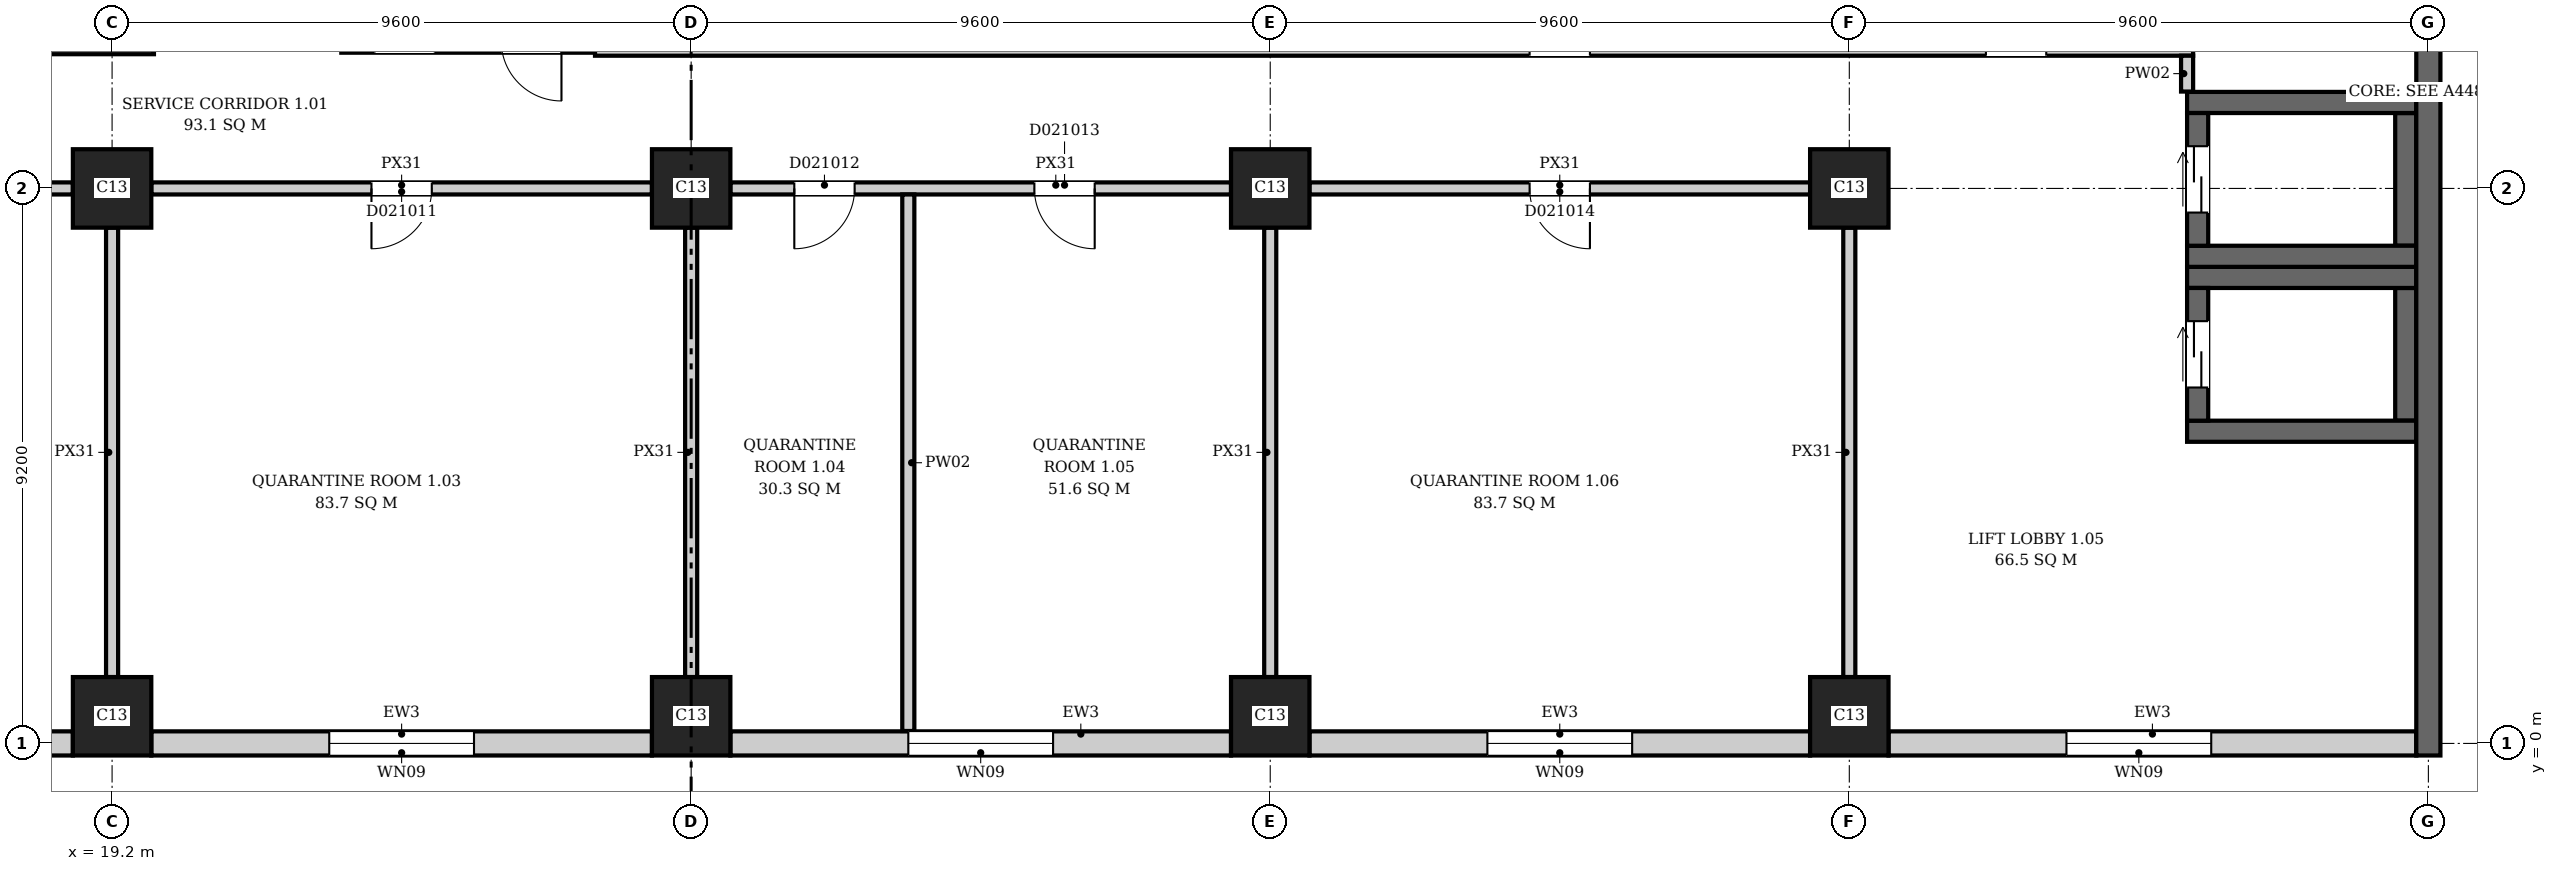
"""IFC4 building model, lengths in metres.
Left out: names, types, materials, properties, quantities, classifications, styles, units other than length and angle.
Written with IfcOpenShell. Run it as: python <this file> out.ifc"""

import sys

from ifc_helpers import new_model, si_unit, direction, frame, frame_2d, origin, origin_2d, place, context, subcontext, project, spatial, rectangle, extrude, element, fill, save


model = new_model("IFC4")
c1 = context("Model", 3, precision=1e-05, world=origin(), true_north=direction((0.0, 1.0)))
c2 = subcontext(c1, "Body", "Model", "MODEL_VIEW")
j1 = project(units=[si_unit("LENGTHUNIT", "METRE"), si_unit("PLANEANGLEUNIT", "RADIAN")], contexts=[c1])
p1 = place(None, origin())
s1 = spatial("IfcSite", under=j1, at=p1, CompositionType="ELEMENT")
p2 = place(p1, origin())
s2 = spatial("IfcBuilding", under=s1, at=p2, CompositionType="ELEMENT")
p3 = place(p2, frame((0.0, 0.0, 6.5)))
s3 = spatial("IfcBuildingStorey", under=s2, at=p3, CompositionType="ELEMENT", Elevation=6.5)
p4 = place(p3, frame((57.6, -0.2, 0.0), z_axis=(0.0, 0.0, 1.0), x_axis=(0.0, 1.0, 0.0)))
e1 = element("IfcWall", 1, at=p4, inside=s3, PredefinedType="SHEAR", context=c2, shape_type="SweptSolid", body=[
    extrude(rectangle(XDim=46.88, YDim=0.4, at=frame_2d((23.44, 0.0))), origin(), (0.0, 0.0, 1.0), 7.7),
])
for number, where, z_axis, x_axis in (
    (2, (53.6, 5.175, 0.0), (0.0, 0.0, 1.0), (1.0, 0.0, 0.0)),
    (3, (53.6, 7.725, 0.0), (0.0, 0.0, 1.0), (1.0, 0.0, 0.0)),
):
    element("IfcWall", number, at=place(p3, frame(where, z_axis=z_axis, x_axis=x_axis)), inside=s3, PredefinedType="SHEAR", context=c2, shape_type="SweptSolid", body=[
        extrude(rectangle(XDim=3.8, YDim=0.35, at=frame_2d((1.9, 0.0))), origin(), (0.0, 0.0, 1.0), 7.7),
    ])
p5 = place(p3, frame((53.775, 5.35, 0.0), z_axis=(0.0, 0.0, 1.0), x_axis=(0.0, 1.0, 0.0)))
e4 = element("IfcWall", 4, at=p5, inside=s3, PredefinedType="SHEAR", context=c2, shape_type="SweptSolid", body=[
    extrude(rectangle(XDim=2.2, YDim=0.35, at=frame_2d((1.1, 0.0))), origin(), (0.0, 0.0, 1.0), 7.7),
])
p6 = place(p5, frame((0.55, 0.0, 0.0)))
e5 = element("IfcOpeningElement", 5, at=p6, cuts=e4, PredefinedType="OPENING", context=c2, shape_type="SweptSolid", body=[
    extrude(rectangle(XDim=1.1, YDim=2.1, at=frame_2d((0.55, 1.05))), frame((0.0, 0.185, 0.0), z_axis=(0.0, -1.0, 0.0), x_axis=(1.0, 0.0, 0.0)), (0.0, 0.0, 1.0), 0.37),
])
p7 = place(p3, frame((57.225, 5.35, 0.0), z_axis=(0.0, 0.0, 1.0), x_axis=(0.0, 1.0, 0.0)))
e6 = element("IfcWall", 6, at=p7, inside=s3, PredefinedType="SHEAR", context=c2, shape_type="SweptSolid", body=[
    extrude(rectangle(XDim=2.2, YDim=0.35, at=frame_2d((1.1, 0.0))), origin(), (0.0, 0.0, 1.0), 7.7),
])
for number, where, z_axis, x_axis in (
    (7, (53.6, 8.075, 0.0), (0.0, 0.0, 1.0), (1.0, 0.0, 0.0)),
    (8, (53.6, 10.625, 0.0), (0.0, 0.0, 1.0), (1.0, 0.0, 0.0)),
):
    element("IfcWall", number, at=place(p3, frame(where, z_axis=z_axis, x_axis=x_axis)), inside=s3, PredefinedType="SHEAR", context=c2, shape_type="SweptSolid", body=[
        extrude(rectangle(XDim=3.8, YDim=0.35, at=frame_2d((1.9, 0.0))), origin(), (0.0, 0.0, 1.0), 7.7),
    ])
p8 = place(p3, frame((53.775, 8.25, 0.0), z_axis=(0.0, 0.0, 1.0), x_axis=(0.0, 1.0, 0.0)))
e9 = element("IfcWall", 9, at=p8, inside=s3, PredefinedType="SHEAR", context=c2, shape_type="SweptSolid", body=[
    extrude(rectangle(XDim=2.2, YDim=0.35, at=frame_2d((1.1, 0.0))), origin(), (0.0, 0.0, 1.0), 7.7),
])
p9 = place(p8, frame((0.55, 0.0, 0.0)))
e10 = element("IfcOpeningElement", 10, at=p9, cuts=e9, PredefinedType="OPENING", context=c2, shape_type="SweptSolid", body=[
    extrude(rectangle(XDim=1.1, YDim=2.1, at=frame_2d((0.55, 1.05))), frame((0.0, 0.185, 0.0), z_axis=(0.0, -1.0, 0.0), x_axis=(1.0, 0.0, 0.0)), (0.0, 0.0, 1.0), 0.37),
])
p10 = place(p3, frame((57.225, 8.25, 0.0), z_axis=(0.0, 0.0, 1.0), x_axis=(0.0, 1.0, 0.0)))
e11 = element("IfcWall", 11, at=p10, inside=s3, PredefinedType="SHEAR", context=c2, shape_type="SweptSolid", body=[
    extrude(rectangle(XDim=2.2, YDim=0.35, at=frame_2d((1.1, 0.0))), origin(), (0.0, 0.0, 1.0), 7.7),
])
for number, where, z_axis, x_axis in (
    (12, (19.2, 0.45, 0.0), (0.0, 0.0, 1.0), (1.0, 0.0, 0.0)),
    (13, (28.8, 0.45, 0.0), (0.0, 0.0, 1.0), (1.0, 0.0, 0.0)),
    (14, (38.4, 0.45, 0.0), (0.0, 0.0, 1.0), (1.0, 0.0, 0.0)),
    (15, (48.0, 0.45, 0.0), (0.0, 0.0, 1.0), (1.0, 0.0, 0.0)),
    (16, (19.2, 9.2, 0.0), (0.0, 0.0, 1.0), (1.0, 0.0, 0.0)),
    (17, (28.8, 9.2, 0.0), (0.0, 0.0, 1.0), (1.0, 0.0, 0.0)),
    (18, (38.4, 9.2, 0.0), (0.0, 0.0, 1.0), (1.0, 0.0, 0.0)),
    (19, (48.0, 9.2, 0.0), (0.0, 0.0, 1.0), (1.0, 0.0, 0.0)),
):
    element("IfcColumn", number, at=place(p3, frame(where, z_axis=z_axis, x_axis=x_axis)), inside=s3, PredefinedType="COLUMN", context=c2, shape_type="SweptSolid", body=[
        extrude(rectangle(XDim=1.3, YDim=1.3, at=origin_2d()), origin(), (0.0, 0.0, 1.0), 7.7),
    ])
p11 = place(p3, frame((10.25, 0.0, 0.0), z_axis=(0.0, 0.0, 1.0), x_axis=(1.0, 0.0, 0.0)))
e20 = element("IfcWall", 20, at=p11, inside=s3, PredefinedType="ELEMENTEDWALL", context=c2, shape_type="SweptSolid", body=[
    extrude(rectangle(XDim=8.3, YDim=0.4, at=frame_2d((4.15, 0.0))), origin(), (0.0, 0.0, 1.0), 7.35),
])
p12 = place(p11, frame((2.95, 0.0, 1.0)))
e21 = element("IfcOpeningElement", 21, at=p12, cuts=e20, PredefinedType="OPENING", context=c2, shape_type="SweptSolid", body=[
    extrude(rectangle(XDim=2.4, YDim=2.2, at=frame_2d((1.2, 1.1))), frame((0.0, 0.21, 0.0), z_axis=(0.0, -1.0, 0.0), x_axis=(1.0, 0.0, 0.0)), (0.0, 0.0, 1.0), 0.42),
])
p13 = place(p3, frame((19.85, 0.0, 0.0), z_axis=(0.0, 0.0, 1.0), x_axis=(1.0, 0.0, 0.0)))
e22 = element("IfcWall", 22, at=p13, inside=s3, PredefinedType="ELEMENTEDWALL", context=c2, shape_type="SweptSolid", body=[
    extrude(rectangle(XDim=8.3, YDim=0.4, at=frame_2d((4.15, 0.0))), origin(), (0.0, 0.0, 1.0), 7.35),
])
p14 = place(p13, frame((2.95, 0.0, 1.0)))
e23 = element("IfcOpeningElement", 23, at=p14, cuts=e22, PredefinedType="OPENING", context=c2, shape_type="SweptSolid", body=[
    extrude(rectangle(XDim=2.4, YDim=2.2, at=frame_2d((1.2, 1.1))), frame((0.0, 0.21, 0.0), z_axis=(0.0, -1.0, 0.0), x_axis=(1.0, 0.0, 0.0)), (0.0, 0.0, 1.0), 0.42),
])
p15 = place(p3, frame((29.45, 0.0, 0.0), z_axis=(0.0, 0.0, 1.0), x_axis=(1.0, 0.0, 0.0)))
e24 = element("IfcWall", 24, at=p15, inside=s3, PredefinedType="ELEMENTEDWALL", context=c2, shape_type="SweptSolid", body=[
    extrude(rectangle(XDim=8.3, YDim=0.4, at=frame_2d((4.15, 0.0))), origin(), (0.0, 0.0, 1.0), 7.35),
])
p16 = place(p15, frame((2.95, 0.0, 1.0)))
e25 = element("IfcOpeningElement", 25, at=p16, cuts=e24, PredefinedType="OPENING", context=c2, shape_type="SweptSolid", body=[
    extrude(rectangle(XDim=2.4, YDim=2.2, at=frame_2d((1.2, 1.1))), frame((0.0, 0.21, 0.0), z_axis=(0.0, -1.0, 0.0), x_axis=(1.0, 0.0, 0.0)), (0.0, 0.0, 1.0), 0.42),
])
p17 = place(p3, frame((39.05, 0.0, 0.0), z_axis=(0.0, 0.0, 1.0), x_axis=(1.0, 0.0, 0.0)))
e26 = element("IfcWall", 26, at=p17, inside=s3, PredefinedType="ELEMENTEDWALL", context=c2, shape_type="SweptSolid", body=[
    extrude(rectangle(XDim=8.3, YDim=0.4, at=frame_2d((4.15, 0.0))), origin(), (0.0, 0.0, 1.0), 7.35),
])
p18 = place(p17, frame((2.95, 0.0, 1.0)))
e27 = element("IfcOpeningElement", 27, at=p18, cuts=e26, PredefinedType="OPENING", context=c2, shape_type="SweptSolid", body=[
    extrude(rectangle(XDim=2.4, YDim=2.2, at=frame_2d((1.2, 1.1))), frame((0.0, 0.21, 0.0), z_axis=(0.0, -1.0, 0.0), x_axis=(1.0, 0.0, 0.0)), (0.0, 0.0, 1.0), 0.42),
])
p19 = place(p3, frame((48.65, 0.0, 0.0), z_axis=(0.0, 0.0, 1.0), x_axis=(1.0, 0.0, 0.0)))
e28 = element("IfcWall", 28, at=p19, inside=s3, PredefinedType="ELEMENTEDWALL", context=c2, shape_type="SweptSolid", body=[
    extrude(rectangle(XDim=8.75, YDim=0.4, at=frame_2d((4.375, 0.0))), origin(), (0.0, 0.0, 1.0), 7.35),
])
p20 = place(p19, frame((2.95, 0.0, 1.0)))
e29 = element("IfcOpeningElement", 29, at=p20, cuts=e28, PredefinedType="OPENING", context=c2, shape_type="SweptSolid", body=[
    extrude(rectangle(XDim=2.4, YDim=2.2, at=frame_2d((1.2, 1.1))), frame((0.0, 0.21, 0.0), z_axis=(0.0, -1.0, 0.0), x_axis=(1.0, 0.0, 0.0)), (0.0, 0.0, 1.0), 0.42),
])
p21 = place(p3, frame((10.25, 9.2, 0.0), z_axis=(0.0, 0.0, 1.0), x_axis=(1.0, 0.0, 0.0)))
e30 = element("IfcWall", 30, at=p21, inside=s3, PredefinedType="PARTITIONING", context=c2, shape_type="SweptSolid", body=[
    extrude(rectangle(XDim=8.3, YDim=0.2, at=frame_2d((4.15, 0.0))), origin(), (0.0, 0.0, 1.0), 6.95),
])
p22 = place(p21, frame((1.06, 0.0, 0.0)))
e31 = element("IfcOpeningElement", 31, at=p22, cuts=e30, PredefinedType="OPENING", context=c2, shape_type="SweptSolid", body=[
    extrude(rectangle(XDim=1.0, YDim=2.1, at=frame_2d((0.5, 1.05))), frame((0.0, 0.11, 0.0), z_axis=(0.0, -1.0, 0.0), x_axis=(1.0, 0.0, 0.0)), (0.0, 0.0, 1.0), 0.22),
])
p23 = place(p21, frame((5.04, 0.0, 0.0)))
e32 = element("IfcOpeningElement", 32, at=p23, cuts=e30, PredefinedType="OPENING", context=c2, shape_type="SweptSolid", body=[
    extrude(rectangle(XDim=1.0, YDim=2.1, at=frame_2d((0.5, 1.05))), frame((0.0, 0.11, 0.0), z_axis=(0.0, -1.0, 0.0), x_axis=(1.0, 0.0, 0.0)), (0.0, 0.0, 1.0), 0.22),
])
p24 = place(p3, frame((10.325, 11.5, 0.0), z_axis=(0.0, 0.0, 1.0), x_axis=(1.0, 0.0, 0.0)))
e33 = element("IfcWall", 33, at=p24, inside=s3, PredefinedType="PARTITIONING", context=c2, shape_type="SweptSolid", body=[
    extrude(rectangle(XDim=9.569, YDim=0.15, at=frame_2d((4.785, 0.0))), origin(), (0.0, 0.0, 1.0), 7.35),
])
p25 = place(p3, frame((19.2, 1.1, 0.0), z_axis=(0.0, 0.0, 1.0), x_axis=(0.0, 1.0, 0.0)))
e34 = element("IfcWall", 34, at=p25, inside=s3, PredefinedType="PARTITIONING", context=c2, shape_type="SweptSolid", body=[
    extrude(rectangle(XDim=7.45, YDim=0.2, at=frame_2d((3.725, 0.0))), origin(), (0.0, 0.0, 1.0), 6.95),
])
p26 = place(p3, frame((19.85, 9.2, 0.0), z_axis=(0.0, 0.0, 1.0), x_axis=(1.0, 0.0, 0.0)))
e35 = element("IfcWall", 35, at=p26, inside=s3, PredefinedType="PARTITIONING", context=c2, shape_type="SweptSolid", body=[
    extrude(rectangle(XDim=8.3, YDim=0.2, at=frame_2d((4.15, 0.0))), origin(), (0.0, 0.0, 1.0), 6.95),
])
p27 = place(p26, frame((3.65, 0.0, 0.0)))
e36 = element("IfcOpeningElement", 36, at=p27, cuts=e35, PredefinedType="OPENING", context=c2, shape_type="SweptSolid", body=[
    extrude(rectangle(XDim=1.0, YDim=2.1, at=frame_2d((0.5, 1.05))), frame((0.0, 0.11, 0.0), z_axis=(0.0, -1.0, 0.0), x_axis=(1.0, 0.0, 0.0)), (0.0, 0.0, 1.0), 0.22),
])
p28 = place(p3, frame((27.206, 11.5, 0.0), z_axis=(0.0, 0.0, 1.0), x_axis=(1.0, 0.0, 0.0)))
e37 = element("IfcWall", 37, at=p28, inside=s3, PredefinedType="PARTITIONING", context=c2, shape_type="SweptSolid", body=[
    extrude(rectangle(XDim=26.494, YDim=0.2, at=frame_2d((13.247, 0.0))), origin(), (0.0, 0.0, 1.0), 7.35),
])
p29 = place(p28, frame((15.494, 0.0, 0.0)))
e38 = element("IfcOpeningElement", 38, at=p29, cuts=e37, PredefinedType="OPENING", context=c2, shape_type="SweptSolid", body=[
    extrude(rectangle(XDim=1.0, YDim=2.1, at=frame_2d((0.5, 1.05))), frame((0.0, 0.11, 0.0), z_axis=(0.0, -1.0, 0.0), x_axis=(1.0, 0.0, 0.0)), (0.0, 0.0, 1.0), 0.22),
])
p30 = place(p28, frame((23.059, 0.0, 0.0)))
e39 = element("IfcOpeningElement", 39, at=p30, cuts=e37, PredefinedType="OPENING", context=c2, shape_type="SweptSolid", body=[
    extrude(rectangle(XDim=1.0, YDim=2.1, at=frame_2d((0.5, 1.05))), frame((0.0, 0.11, 0.0), z_axis=(0.0, -1.0, 0.0), x_axis=(1.0, 0.0, 0.0)), (0.0, 0.0, 1.0), 0.22),
])
p31 = place(p3, frame((28.8, 1.1, 0.0), z_axis=(0.0, 0.0, 1.0), x_axis=(0.0, 1.0, 0.0)))
e40 = element("IfcWall", 40, at=p31, inside=s3, PredefinedType="PARTITIONING", context=c2, shape_type="SweptSolid", body=[
    extrude(rectangle(XDim=7.45, YDim=0.2, at=frame_2d((3.725, 0.0))), origin(), (0.0, 0.0, 1.0), 6.95),
])
p32 = place(p3, frame((29.45, 9.2, 0.0), z_axis=(0.0, 0.0, 1.0), x_axis=(1.0, 0.0, 0.0)))
e41 = element("IfcWall", 41, at=p32, inside=s3, PredefinedType="PARTITIONING", context=c2, shape_type="SweptSolid", body=[
    extrude(rectangle(XDim=8.3, YDim=0.2, at=frame_2d((4.15, 0.0))), origin(), (0.0, 0.0, 1.0), 6.95),
])
p33 = place(p32, frame((1.06, 0.0, 0.0)))
e42 = element("IfcOpeningElement", 42, at=p33, cuts=e41, PredefinedType="OPENING", context=c2, shape_type="SweptSolid", body=[
    extrude(rectangle(XDim=1.0, YDim=2.1, at=frame_2d((0.5, 1.05))), frame((0.0, 0.11, 0.0), z_axis=(0.0, -1.0, 0.0), x_axis=(1.0, 0.0, 0.0)), (0.0, 0.0, 1.0), 0.22),
])
p34 = place(p32, frame((5.04, 0.0, 0.0)))
e43 = element("IfcOpeningElement", 43, at=p34, cuts=e41, PredefinedType="OPENING", context=c2, shape_type="SweptSolid", body=[
    extrude(rectangle(XDim=1.0, YDim=2.1, at=frame_2d((0.5, 1.05))), frame((0.0, 0.11, 0.0), z_axis=(0.0, -1.0, 0.0), x_axis=(1.0, 0.0, 0.0)), (0.0, 0.0, 1.0), 0.22),
])
p35 = place(p3, frame((32.4, 0.206, 0.0), z_axis=(0.0, 0.0, 1.0), x_axis=(0.0, 1.0, 0.0)))
e44 = element("IfcWall", 44, at=p35, inside=s3, PredefinedType="PARTITIONING", context=c2, shape_type="SweptSolid", body=[
    extrude(rectangle(XDim=8.894, YDim=0.2, at=frame_2d((4.447, 0.0))), origin(), (0.0, 0.0, 1.0), 7.35),
])
p36 = place(p3, frame((38.4, 1.1, 0.0), z_axis=(0.0, 0.0, 1.0), x_axis=(0.0, 1.0, 0.0)))
e45 = element("IfcWall", 45, at=p36, inside=s3, PredefinedType="PARTITIONING", context=c2, shape_type="SweptSolid", body=[
    extrude(rectangle(XDim=7.45, YDim=0.2, at=frame_2d((3.725, 0.0))), origin(), (0.0, 0.0, 1.0), 6.95),
])
p37 = place(p3, frame((39.05, 9.2, 0.0), z_axis=(0.0, 0.0, 1.0), x_axis=(1.0, 0.0, 0.0)))
e46 = element("IfcWall", 46, at=p37, inside=s3, PredefinedType="PARTITIONING", context=c2, shape_type="SweptSolid", body=[
    extrude(rectangle(XDim=8.3, YDim=0.2, at=frame_2d((4.15, 0.0))), origin(), (0.0, 0.0, 1.0), 6.95),
])
p38 = place(p37, frame((3.65, 0.0, 0.0)))
e47 = element("IfcOpeningElement", 47, at=p38, cuts=e46, PredefinedType="OPENING", context=c2, shape_type="SweptSolid", body=[
    extrude(rectangle(XDim=1.0, YDim=2.1, at=frame_2d((0.5, 1.05))), frame((0.0, 0.11, 0.0), z_axis=(0.0, -1.0, 0.0), x_axis=(1.0, 0.0, 0.0)), (0.0, 0.0, 1.0), 0.22),
])
p39 = place(p3, frame((48.0, 1.1, 0.0), z_axis=(0.0, 0.0, 1.0), x_axis=(0.0, 1.0, 0.0)))
e48 = element("IfcWall", 48, at=p39, inside=s3, PredefinedType="PARTITIONING", context=c2, shape_type="SweptSolid", body=[
    extrude(rectangle(XDim=7.45, YDim=0.2, at=frame_2d((3.725, 0.0))), origin(), (0.0, 0.0, 1.0), 6.95),
])
p40 = place(p3, frame((53.6, 10.806, 0.0), z_axis=(0.0, 0.0, 1.0), x_axis=(0.0, 1.0, 0.0)))
e49 = element("IfcWall", 49, at=p40, inside=s3, PredefinedType="PARTITIONING", context=c2, shape_type="SweptSolid", body=[
    extrude(rectangle(XDim=0.594, YDim=0.2, at=frame_2d((0.297, 0.0))), origin(), (0.0, 0.0, 1.0), 7.35),
])
p41 = place(p14, origin())
e50 = element("IfcWindow", 50, at=p41, inside=s3, PartitioningType="SINGLE_PANEL", PredefinedType="WINDOW", context=c2, shape_type="SweptSolid", body=[
    extrude(rectangle(XDim=2.4, YDim=2.2, at=frame_2d((1.2, 1.1))), frame((0.0, 0.03, 0.0), z_axis=(0.0, -1.0, 0.0), x_axis=(1.0, 0.0, 0.0)), (0.0, 0.0, 1.0), 0.06),
])
fill(e23, e50)
p42 = place(p16, origin())
e51 = element("IfcWindow", 51, at=p42, inside=s3, PartitioningType="SINGLE_PANEL", PredefinedType="WINDOW", context=c2, shape_type="SweptSolid", body=[
    extrude(rectangle(XDim=2.4, YDim=2.2, at=frame_2d((1.2, 1.1))), frame((0.0, 0.03, 0.0), z_axis=(0.0, -1.0, 0.0), x_axis=(1.0, 0.0, 0.0)), (0.0, 0.0, 1.0), 0.06),
])
fill(e25, e51)
p43 = place(p18, origin())
e52 = element("IfcWindow", 52, at=p43, inside=s3, PartitioningType="SINGLE_PANEL", PredefinedType="WINDOW", context=c2, shape_type="SweptSolid", body=[
    extrude(rectangle(XDim=2.4, YDim=2.2, at=frame_2d((1.2, 1.1))), frame((0.0, 0.03, 0.0), z_axis=(0.0, -1.0, 0.0), x_axis=(1.0, 0.0, 0.0)), (0.0, 0.0, 1.0), 0.06),
])
fill(e27, e52)
p44 = place(p20, origin())
e53 = element("IfcWindow", 53, at=p44, inside=s3, PartitioningType="SINGLE_PANEL", PredefinedType="WINDOW", context=c2, shape_type="SweptSolid", body=[
    extrude(rectangle(XDim=2.4, YDim=2.2, at=frame_2d((1.2, 1.1))), frame((0.0, 0.03, 0.0), z_axis=(0.0, -1.0, 0.0), x_axis=(1.0, 0.0, 0.0)), (0.0, 0.0, 1.0), 0.06),
])
fill(e29, e53)
p45 = place(p6, origin())
e54 = element("IfcDoor", 54, at=p45, inside=s3, OperationType="DOUBLE_DOOR_SLIDING", PredefinedType="DOOR", context=c2, shape_type="SweptSolid", body=[
    extrude(rectangle(XDim=1.1, YDim=2.1, at=frame_2d((0.55, 1.05))), frame((0.0, 0.025, 0.0), z_axis=(0.0, -1.0, 0.0), x_axis=(1.0, 0.0, 0.0)), (0.0, 0.0, 1.0), 0.05),
])
fill(e5, e54)
p46 = place(p9, origin())
e55 = element("IfcDoor", 55, at=p46, inside=s3, OperationType="DOUBLE_DOOR_SLIDING", PredefinedType="DOOR", context=c2, shape_type="SweptSolid", body=[
    extrude(rectangle(XDim=1.1, YDim=2.1, at=frame_2d((0.55, 1.05))), frame((0.0, 0.025, 0.0), z_axis=(0.0, -1.0, 0.0), x_axis=(1.0, 0.0, 0.0)), (0.0, 0.0, 1.0), 0.05),
])
fill(e10, e55)
p47 = place(p27, origin())
e56 = element("IfcDoor", 56, at=p47, inside=s3, OperationType="SINGLE_SWING_LEFT", PredefinedType="DOOR", context=c2, shape_type="SweptSolid", body=[
    extrude(rectangle(XDim=1.0, YDim=2.1, at=frame_2d((0.5, 1.05))), frame((0.0, 0.025, 0.0), z_axis=(0.0, -1.0, 0.0), x_axis=(1.0, 0.0, 0.0)), (0.0, 0.0, 1.0), 0.05),
])
fill(e36, e56)
p48 = place(p33, origin())
e57 = element("IfcDoor", 57, at=p48, inside=s3, OperationType="SINGLE_SWING_LEFT", PredefinedType="DOOR", context=c2, shape_type="SweptSolid", body=[
    extrude(rectangle(XDim=1.0, YDim=2.1, at=frame_2d((0.5, 1.05))), frame((0.0, 0.025, 0.0), z_axis=(0.0, -1.0, 0.0), x_axis=(1.0, 0.0, 0.0)), (0.0, 0.0, 1.0), 0.05),
])
fill(e42, e57)
p49 = place(p34, origin())
e58 = element("IfcDoor", 58, at=p49, inside=s3, OperationType="SINGLE_SWING_RIGHT", PredefinedType="DOOR", context=c2, shape_type="SweptSolid", body=[
    extrude(rectangle(XDim=1.0, YDim=2.1, at=frame_2d((0.5, 1.05))), frame((0.0, 0.025, 0.0), z_axis=(0.0, -1.0, 0.0), x_axis=(1.0, 0.0, 0.0)), (0.0, 0.0, 1.0), 0.05),
])
fill(e43, e58)
p50 = place(p38, origin())
e59 = element("IfcDoor", 59, at=p50, inside=s3, OperationType="SINGLE_SWING_RIGHT", PredefinedType="DOOR", context=c2, shape_type="SweptSolid", body=[
    extrude(rectangle(XDim=1.0, YDim=2.1, at=frame_2d((0.5, 1.05))), frame((0.0, 0.025, 0.0), z_axis=(0.0, -1.0, 0.0), x_axis=(1.0, 0.0, 0.0)), (0.0, 0.0, 1.0), 0.05),
])
fill(e47, e59)
save(model, sys.argv[1])
